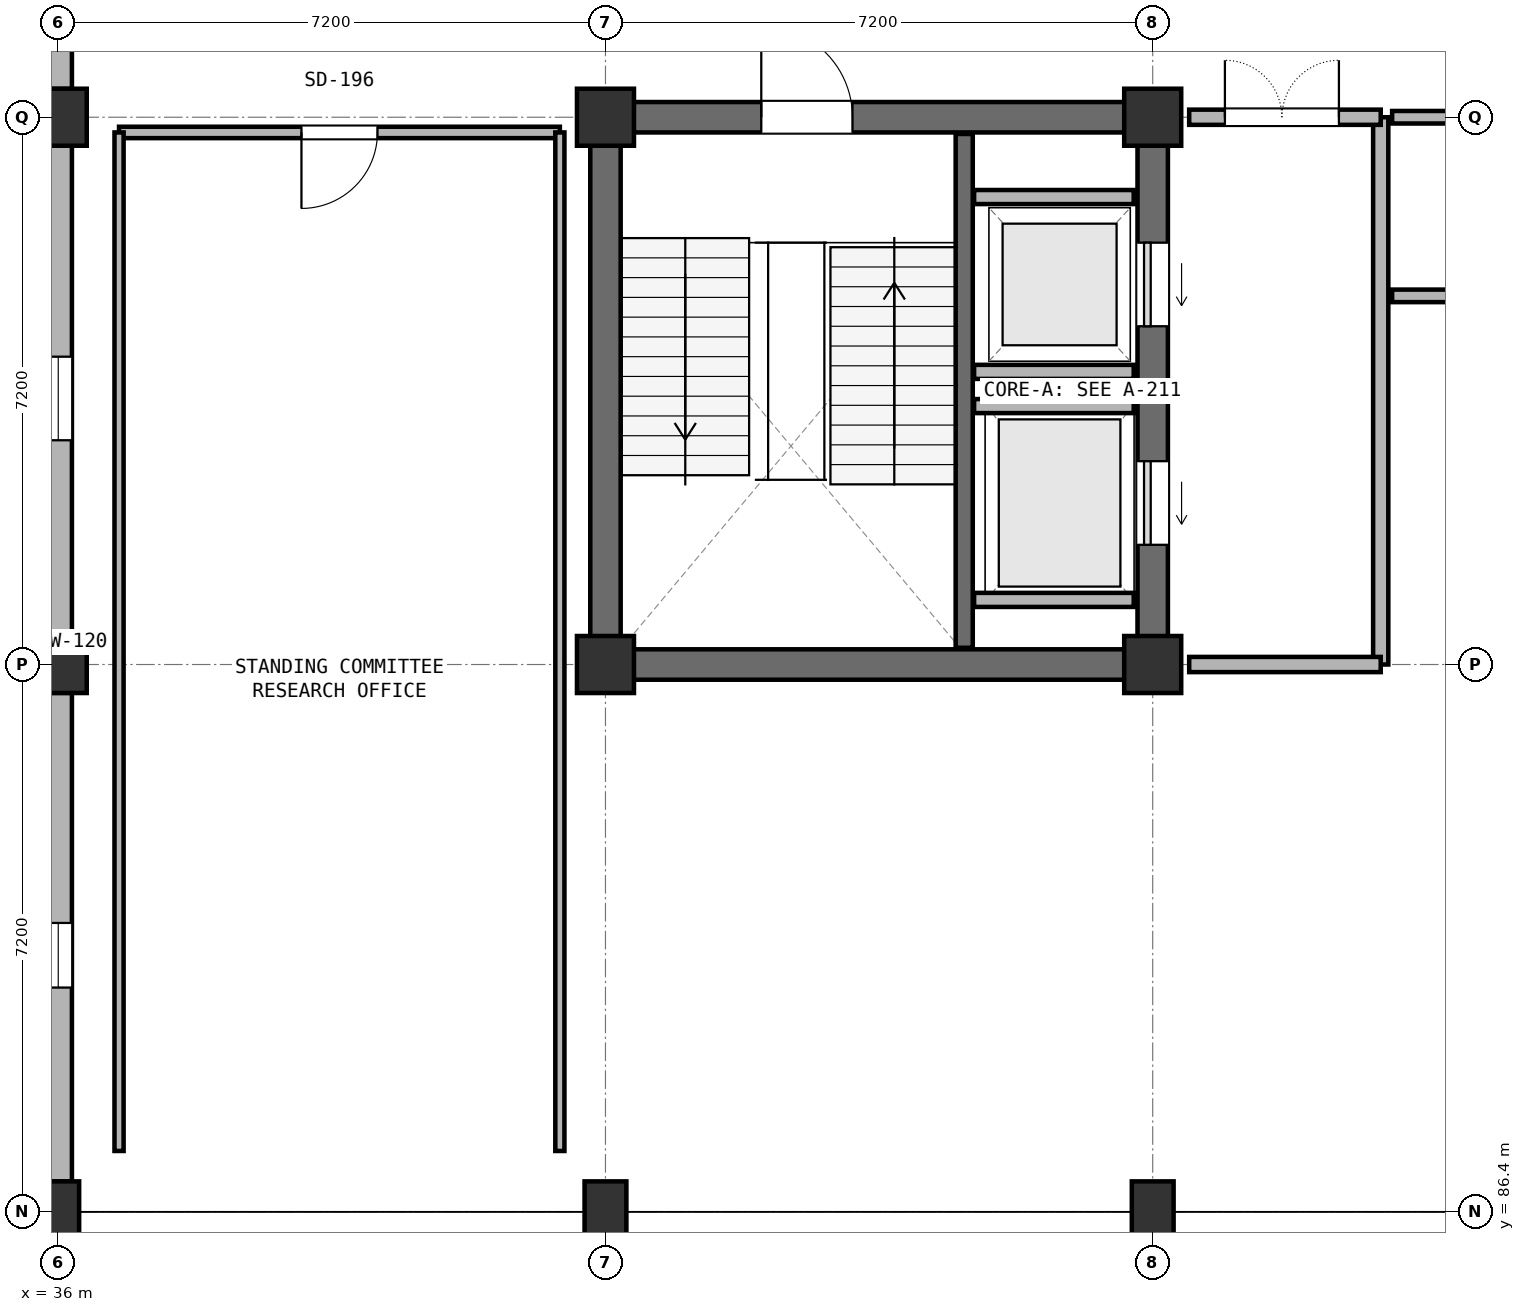
"""IFC4 building model, lengths in metres.
Left out: names, types, materials, properties, quantities, classifications, styles, units other than length and angle.
Written with IfcOpenShell. Run it as: python <this file> out.ifc"""

import sys

from ifc_helpers import new_model, si_unit, direction, frame, frame_2d, origin, origin_2d, place, context, subcontext, project, spatial, rectangle, extrude, element, fill, save


model = new_model("IFC4")
c1 = context("Model", 3, precision=1e-05, world=origin(), true_north=direction((0.0, 1.0)))
c2 = subcontext(c1, "Body", "Model", "MODEL_VIEW")
j1 = project(units=[si_unit("LENGTHUNIT", "METRE"), si_unit("PLANEANGLEUNIT", "RADIAN")], contexts=[c1])
p1 = place(None, origin())
s1 = spatial("IfcSite", under=j1, at=p1, CompositionType="ELEMENT")
p2 = place(p1, origin())
s2 = spatial("IfcBuilding", under=s1, at=p2, CompositionType="ELEMENT")
p3 = place(p2, frame((0.0, 0.0, 10.2)))
s3 = spatial("IfcBuildingStorey", under=s2, at=p3, CompositionType="ELEMENT", Elevation=10.2)
p4 = place(p3, frame((36.0, 86.4, 0.0), z_axis=(0.0, 0.0, 1.0), x_axis=(1.0, 0.0, 0.0)))
e1 = element("IfcColumn", 1, at=p4, inside=s3, PredefinedType="COLUMN", context=c2, shape_type="SweptSolid", body=[
    extrude(rectangle(XDim=0.55, YDim=0.8, at=origin_2d()), origin(), (0.0, 0.0, 1.0), 4.2),
])
for number, where, z_axis, x_axis in (
    (2, (36.0, 93.6, 0.0), (0.0, 0.0, 1.0), (1.0, 0.0, 0.0)),
    (3, (36.0, 100.8, 0.0), (0.0, 0.0, 1.0), (1.0, 0.0, 0.0)),
):
    element("IfcColumn", number, at=place(p3, frame(where, z_axis=z_axis, x_axis=x_axis)), inside=s3, PredefinedType="COLUMN", context=c2, shape_type="SweptSolid", body=[
        extrude(rectangle(XDim=0.75, YDim=0.75, at=origin_2d()), origin(), (0.0, 0.0, 1.0), 4.2),
    ])
p5 = place(p3, frame((43.2, 86.4, 0.0), z_axis=(0.0, 0.0, 1.0), x_axis=(1.0, 0.0, 0.0)))
e4 = element("IfcColumn", 4, at=p5, inside=s3, PredefinedType="COLUMN", context=c2, shape_type="SweptSolid", body=[
    extrude(rectangle(XDim=0.55, YDim=0.8, at=origin_2d()), origin(), (0.0, 0.0, 1.0), 4.2),
])
for number, where, z_axis, x_axis in (
    (5, (43.2, 93.6, 0.0), (0.0, 0.0, 1.0), (1.0, 0.0, 0.0)),
    (6, (43.2, 100.8, 0.0), (0.0, 0.0, 1.0), (1.0, 0.0, 0.0)),
):
    element("IfcColumn", number, at=place(p3, frame(where, z_axis=z_axis, x_axis=x_axis)), inside=s3, PredefinedType="COLUMN", context=c2, shape_type="SweptSolid", body=[
        extrude(rectangle(XDim=0.75, YDim=0.75, at=origin_2d()), origin(), (0.0, 0.0, 1.0), 4.2),
    ])
p6 = place(p3, frame((50.4, 86.4, 0.0), z_axis=(0.0, 0.0, 1.0), x_axis=(1.0, 0.0, 0.0)))
e7 = element("IfcColumn", 7, at=p6, inside=s3, PredefinedType="COLUMN", context=c2, shape_type="SweptSolid", body=[
    extrude(rectangle(XDim=0.55, YDim=0.8, at=origin_2d()), origin(), (0.0, 0.0, 1.0), 4.2),
])
for number, where, z_axis, x_axis in (
    (8, (50.4, 93.6, 0.0), (0.0, 0.0, 1.0), (1.0, 0.0, 0.0)),
    (9, (50.4, 100.8, 0.0), (0.0, 0.0, 1.0), (1.0, 0.0, 0.0)),
):
    element("IfcColumn", number, at=place(p3, frame(where, z_axis=z_axis, x_axis=x_axis)), inside=s3, PredefinedType="COLUMN", context=c2, shape_type="SweptSolid", body=[
        extrude(rectangle(XDim=0.75, YDim=0.75, at=origin_2d()), origin(), (0.0, 0.0, 1.0), 4.2),
    ])
p7 = place(p3, frame((43.55, 93.6, 0.0), z_axis=(0.0, 0.0, 1.0), x_axis=(1.0, 0.0, 0.0)))
e10 = element("IfcWall", 10, at=p7, inside=s3, PredefinedType="SHEAR", context=c2, shape_type="SweptSolid", body=[
    extrude(rectangle(XDim=6.5, YDim=0.4, at=frame_2d((3.25, 0.0))), origin(), (0.0, 0.0, 1.0), 4.2),
])
p8 = place(p3, frame((50.4, 93.95, 0.0), z_axis=(0.0, 0.0, 1.0), x_axis=(0.0, 1.0, 0.0)))
e11 = element("IfcWall", 11, at=p8, inside=s3, PredefinedType="SHEAR", context=c2, shape_type="SweptSolid", body=[
    extrude(rectangle(XDim=6.5, YDim=0.4, at=frame_2d((3.25, 0.0))), origin(), (0.0, 0.0, 1.0), 4.2),
])
p9 = place(p8, frame((1.225, 0.0, 0.0)))
e12 = element("IfcOpeningElement", 12, at=p9, cuts=e11, PredefinedType="OPENING", context=c2, shape_type="SweptSolid", body=[
    extrude(rectangle(XDim=1.1, YDim=2.2, at=frame_2d((0.55, 1.1))), frame((0.0, 0.21, 0.0), z_axis=(0.0, -1.0, 0.0), x_axis=(1.0, 0.0, 0.0)), (0.0, 0.0, 1.0), 0.42),
])
p10 = place(p8, frame((4.1, 0.0, 0.0)))
e13 = element("IfcOpeningElement", 13, at=p10, cuts=e11, PredefinedType="OPENING", context=c2, shape_type="SweptSolid", body=[
    extrude(rectangle(XDim=1.1, YDim=2.2, at=frame_2d((0.55, 1.1))), frame((0.0, 0.21, 0.0), z_axis=(0.0, -1.0, 0.0), x_axis=(1.0, 0.0, 0.0)), (0.0, 0.0, 1.0), 0.42),
])
p11 = place(p3, frame((50.05, 100.8, 0.0), z_axis=(0.0, 0.0, 1.0), x_axis=(-1.0, 0.0, 0.0)))
e14 = element("IfcWall", 14, at=p11, inside=s3, PredefinedType="SHEAR", context=c2, shape_type="SweptSolid", body=[
    extrude(rectangle(XDim=6.5, YDim=0.4, at=frame_2d((3.25, 0.0))), origin(), (0.0, 0.0, 1.0), 4.2),
])
p12 = place(p11, frame((3.6, 0.0, 0.0)))
e15 = element("IfcOpeningElement", 15, at=p12, cuts=e14, PredefinedType="OPENING", context=c2, shape_type="SweptSolid", body=[
    extrude(rectangle(XDim=1.2, YDim=2.2, at=frame_2d((0.6, 1.1))), frame((0.0, 0.21, 0.0), z_axis=(0.0, -1.0, 0.0), x_axis=(1.0, 0.0, 0.0)), (0.0, 0.0, 1.0), 0.42),
])
p13 = place(p3, frame((43.2, 100.45, 0.0), z_axis=(0.0, 0.0, 1.0), x_axis=(0.0, -1.0, 0.0)))
e16 = element("IfcWall", 16, at=p13, inside=s3, PredefinedType="SHEAR", context=c2, shape_type="SweptSolid", body=[
    extrude(rectangle(XDim=6.5, YDim=0.4, at=frame_2d((3.25, 0.0))), origin(), (0.0, 0.0, 1.0), 4.2),
])
p14 = place(p3, frame((47.92, 93.82, 0.0), z_axis=(0.0, 0.0, 1.0), x_axis=(0.0, 1.0, 0.0)))
e17 = element("IfcWall", 17, at=p14, inside=s3, PredefinedType="SHEAR", context=c2, shape_type="SweptSolid", body=[
    extrude(rectangle(XDim=6.76, YDim=0.225, at=frame_2d((3.38, 0.0))), origin(), (0.0, 0.0, 1.0), 4.2),
])
for number, where, z_axis, x_axis in (
    (18, (48.05, 94.45, 0.0), (0.0, 0.0, 1.0), (1.0, 0.0, 0.0)),
    (19, (48.05, 97.0, 0.0), (0.0, 0.0, 1.0), (1.0, 0.0, 0.0)),
    (20, (48.05, 97.45, 0.0), (0.0, 0.0, 1.0), (1.0, 0.0, 0.0)),
    (21, (48.05, 99.75, 0.0), (0.0, 0.0, 1.0), (1.0, 0.0, 0.0)),
):
    element("IfcWall", number, at=place(p3, frame(where, z_axis=z_axis, x_axis=x_axis)), inside=s3, PredefinedType="PARTITIONING", context=c2, shape_type="SweptSolid", body=[
        extrude(rectangle(XDim=2.1, YDim=0.185, at=frame_2d((1.05, 0.0))), origin(), (0.0, 0.0, 1.0), 4.2),
    ])
p15 = place(p3, frame((36.0, 86.798, 0.0), z_axis=(0.0, 0.0, 1.0), x_axis=(0.0, 1.0, 0.0)))
e22 = element("IfcWall", 22, at=p15, inside=s3, PredefinedType="SOLIDWALL", context=c2, shape_type="SweptSolid", body=[
    extrude(rectangle(XDim=6.429, YDim=0.36, at=frame_2d((3.214, 0.0))), origin(), (0.0, 0.0, 1.0), 3.04),
])
p16 = place(p15, frame((2.552, 0.0, 0.7)))
e23 = element("IfcOpeningElement", 23, at=p16, cuts=e22, PredefinedType="OPENING", context=c2, shape_type="SweptSolid", body=[
    extrude(rectangle(XDim=0.85, YDim=2.19, at=frame_2d((0.425, 1.095))), frame((0.0, 0.19, 0.0), z_axis=(0.0, -1.0, 0.0), x_axis=(1.0, 0.0, 0.0)), (0.0, 0.0, 1.0), 0.38),
])
p17 = place(p3, frame((36.0, 93.973, 0.0), z_axis=(0.0, 0.0, 1.0), x_axis=(0.0, 1.0, 0.0)))
e24 = element("IfcWall", 24, at=p17, inside=s3, PredefinedType="SOLIDWALL", context=c2, shape_type="SweptSolid", body=[
    extrude(rectangle(XDim=6.454, YDim=0.36, at=frame_2d((3.227, 0.0))), origin(), (0.0, 0.0, 1.0), 3.04),
])
p18 = place(p17, frame((2.577, 0.0, 0.7)))
e25 = element("IfcOpeningElement", 25, at=p18, cuts=e24, PredefinedType="OPENING", context=c2, shape_type="SweptSolid", body=[
    extrude(rectangle(XDim=1.1, YDim=2.19, at=frame_2d((0.55, 1.095))), frame((0.0, 0.19, 0.0), z_axis=(0.0, -1.0, 0.0), x_axis=(1.0, 0.0, 0.0)), (0.0, 0.0, 1.0), 0.38),
])
p19 = place(p3, frame((36.0, 101.173, 0.0), z_axis=(0.0, 0.0, 1.0), x_axis=(0.0, 1.0, 0.0)))
e26 = element("IfcWall", 26, at=p19, inside=s3, PredefinedType="SOLIDWALL", context=c2, shape_type="SweptSolid", body=[
    extrude(rectangle(XDim=6.454, YDim=0.36, at=frame_2d((3.227, 0.0))), origin(), (0.0, 0.0, 1.0), 3.04),
])
p20 = place(p19, frame((2.577, 0.0, 0.7)))
e27 = element("IfcOpeningElement", 27, at=p20, cuts=e26, PredefinedType="OPENING", context=c2, shape_type="SweptSolid", body=[
    extrude(rectangle(XDim=0.85, YDim=2.19, at=frame_2d((0.425, 1.095))), frame((0.0, 0.19, 0.0), z_axis=(0.0, -1.0, 0.0), x_axis=(1.0, 0.0, 0.0)), (0.0, 0.0, 1.0), 0.38),
])
p21 = place(p3, frame((53.4, 93.6, 0.0), z_axis=(0.0, 0.0, 1.0), x_axis=(0.0, 1.0, 0.0)))
e28 = element("IfcWall", 28, at=p21, inside=s3, PredefinedType="PARTITIONING", context=c2, shape_type="SweptSolid", body=[
    extrude(rectangle(XDim=7.2, YDim=0.2, at=frame_2d((3.6, 0.0))), origin(), (0.0, 0.0, 1.0), 3.08),
])
p22 = place(p3, frame((50.88, 93.6, 0.0), z_axis=(0.0, 0.0, 1.0), x_axis=(1.0, 0.0, 0.0)))
e29 = element("IfcWall", 29, at=p22, inside=s3, PredefinedType="PARTITIONING", context=c2, shape_type="SweptSolid", body=[
    extrude(rectangle(XDim=2.52, YDim=0.2, at=frame_2d((1.26, 0.0))), origin(), (0.0, 0.0, 1.0), 3.08),
])
p23 = place(p3, frame((53.4, 100.8, 0.0), z_axis=(0.0, 0.0, 1.0), x_axis=(-1.0, 0.0, 0.0)))
e30 = element("IfcWall", 30, at=p23, inside=s3, PredefinedType="PARTITIONING", context=c2, shape_type="SweptSolid", body=[
    extrude(rectangle(XDim=2.52, YDim=0.2, at=frame_2d((1.26, 0.0))), origin(), (0.0, 0.0, 1.0), 3.08),
])
p24 = place(p23, frame((0.55, 0.0, 0.0)))
e31 = element("IfcOpeningElement", 31, at=p24, cuts=e30, PredefinedType="OPENING", context=c2, shape_type="SweptSolid", body=[
    extrude(rectangle(XDim=1.5, YDim=2.2, at=frame_2d((0.75, 1.1))), frame((0.0, 0.11, 0.0), z_axis=(0.0, -1.0, 0.0), x_axis=(1.0, 0.0, 0.0)), (0.0, 0.0, 1.0), 0.22),
])
p25 = place(p3, frame((56.75, 100.8, 0.0), z_axis=(0.0, 0.0, 1.0), x_axis=(-1.0, 0.0, 0.0)))
e32 = element("IfcWall", 32, at=p25, inside=s3, PredefinedType="PARTITIONING", context=c2, shape_type="SweptSolid", body=[
    extrude(rectangle(XDim=3.2, YDim=0.165, at=frame_2d((1.6, 0.0))), origin(), (0.0, 0.0, 1.0), 3.08),
])
p26 = place(p25, frame((0.95, 0.0, 0.0)))
e33 = element("IfcOpeningElement", 33, at=p26, cuts=e32, PredefinedType="OPENING", context=c2, shape_type="SweptSolid", body=[
    extrude(rectangle(XDim=0.95, YDim=2.15, at=frame_2d((0.475, 1.075))), frame((0.0, 0.093, 0.0), z_axis=(0.0, -1.0, 0.0), x_axis=(1.0, 0.0, 0.0)), (0.0, 0.0, 1.0), 0.185),
])
p27 = place(p3, frame((53.55, 98.45, 0.0), z_axis=(0.0, 0.0, 1.0), x_axis=(1.0, 0.0, 0.0)))
e34 = element("IfcWall", 34, at=p27, inside=s3, PredefinedType="PARTITIONING", context=c2, shape_type="SweptSolid", body=[
    extrude(rectangle(XDim=3.2, YDim=0.165, at=frame_2d((1.6, 0.0))), origin(), (0.0, 0.0, 1.0), 3.08),
])
p28 = place(p3, frame((42.6, 100.6, 0.0), z_axis=(0.0, 0.0, 1.0), x_axis=(-1.0, 0.0, 0.0)))
e35 = element("IfcWall", 35, at=p28, inside=s3, PredefinedType="PARTITIONING", context=c2, shape_type="SweptSolid", body=[
    extrude(rectangle(XDim=5.8, YDim=0.15, at=frame_2d((2.9, 0.0))), origin(), (0.0, 0.0, 1.0), 3.08),
])
p29 = place(p28, frame((2.4, 0.0, 0.0)))
e36 = element("IfcOpeningElement", 36, at=p29, cuts=e35, PredefinedType="OPENING", context=c2, shape_type="SweptSolid", body=[
    extrude(rectangle(XDim=1.0, YDim=2.15, at=frame_2d((0.5, 1.075))), frame((0.0, 0.085, 0.0), z_axis=(0.0, -1.0, 0.0), x_axis=(1.0, 0.0, 0.0)), (0.0, 0.0, 1.0), 0.17),
])
for number, where, z_axis, x_axis in (
    (37, (36.8, 87.2, 0.0), (0.0, 0.0, 1.0), (0.0, 1.0, 0.0)),
    (38, (42.6, 100.6, 0.0), (0.0, 0.0, 1.0), (0.0, -1.0, 0.0)),
):
    element("IfcWall", number, at=place(p3, frame(where, z_axis=z_axis, x_axis=x_axis)), inside=s3, PredefinedType="PARTITIONING", context=c2, shape_type="SweptSolid", body=[
        extrude(rectangle(XDim=13.4, YDim=0.12, at=frame_2d((6.7, 0.0))), origin(), (0.0, 0.0, 1.0), 3.08),
    ])
p30 = place(p9, origin())
e39 = element("IfcDoor", 39, at=p30, inside=s3, OperationType="SLIDING_TO_LEFT", PredefinedType="DOOR", context=c2, shape_type="SweptSolid", body=[
    extrude(rectangle(XDim=1.1, YDim=2.2, at=frame_2d((0.55, 1.1))), frame((0.0, 0.025, 0.0), z_axis=(0.0, -1.0, 0.0), x_axis=(1.0, 0.0, 0.0)), (0.0, 0.0, 1.0), 0.05),
])
fill(e12, e39)
p31 = place(p10, origin())
e40 = element("IfcDoor", 40, at=p31, inside=s3, OperationType="SLIDING_TO_LEFT", PredefinedType="DOOR", context=c2, shape_type="SweptSolid", body=[
    extrude(rectangle(XDim=1.1, YDim=2.2, at=frame_2d((0.55, 1.1))), frame((0.0, 0.025, 0.0), z_axis=(0.0, -1.0, 0.0), x_axis=(1.0, 0.0, 0.0)), (0.0, 0.0, 1.0), 0.05),
])
fill(e13, e40)
p32 = place(p16, origin())
e41 = element("IfcWindow", 41, at=p32, inside=s3, PartitioningType="SINGLE_PANEL", PredefinedType="WINDOW", context=c2, shape_type="SweptSolid", body=[
    extrude(rectangle(XDim=0.85, YDim=2.19, at=frame_2d((0.425, 1.095))), frame((0.0, 0.03, 0.0), z_axis=(0.0, -1.0, 0.0), x_axis=(1.0, 0.0, 0.0)), (0.0, 0.0, 1.0), 0.06),
])
fill(e23, e41)
p33 = place(p18, origin())
e42 = element("IfcWindow", 42, at=p33, inside=s3, PartitioningType="SINGLE_PANEL", PredefinedType="WINDOW", context=c2, shape_type="SweptSolid", body=[
    extrude(rectangle(XDim=1.1, YDim=2.19, at=frame_2d((0.55, 1.095))), frame((0.0, 0.03, 0.0), z_axis=(0.0, -1.0, 0.0), x_axis=(1.0, 0.0, 0.0)), (0.0, 0.0, 1.0), 0.06),
])
fill(e25, e42)
p34 = place(p12, frame((1.2, 0.0, 0.0), z_axis=(0.0, 0.0, 1.0), x_axis=(-1.0, 0.0, 0.0)))
e43 = element("IfcDoor", 43, at=p34, inside=s3, OperationType="SINGLE_SWING_LEFT", PredefinedType="DOOR", context=c2, shape_type="SweptSolid", body=[
    extrude(rectangle(XDim=1.2, YDim=2.2, at=frame_2d((0.6, 1.1))), frame((0.0, 0.025, 0.0), z_axis=(0.0, -1.0, 0.0), x_axis=(1.0, 0.0, 0.0)), (0.0, 0.0, 1.0), 0.05),
])
fill(e15, e43)
p35 = place(p24, frame((1.5, 0.0, 0.0), z_axis=(0.0, 0.0, 1.0), x_axis=(-1.0, 0.0, 0.0)))
e44 = element("IfcDoor", 44, at=p35, inside=s3, OperationType="DOUBLE_DOOR_SINGLE_SWING", PredefinedType="DOOR", context=c2, shape_type="SweptSolid", body=[
    extrude(rectangle(XDim=1.5, YDim=2.2, at=frame_2d((0.75, 1.1))), frame((0.0, 0.025, 0.0), z_axis=(0.0, -1.0, 0.0), x_axis=(1.0, 0.0, 0.0)), (0.0, 0.0, 1.0), 0.05),
])
fill(e31, e44)
p36 = place(p29, origin())
e45 = element("IfcDoor", 45, at=p36, inside=s3, OperationType="SINGLE_SWING_RIGHT", PredefinedType="DOOR", context=c2, shape_type="SweptSolid", body=[
    extrude(rectangle(XDim=1.0, YDim=2.15, at=frame_2d((0.5, 1.075))), frame((0.0, 0.025, 0.0), z_axis=(0.0, -1.0, 0.0), x_axis=(1.0, 0.0, 0.0)), (0.0, 0.0, 1.0), 0.05),
])
fill(e36, e45)
save(model, sys.argv[1])
